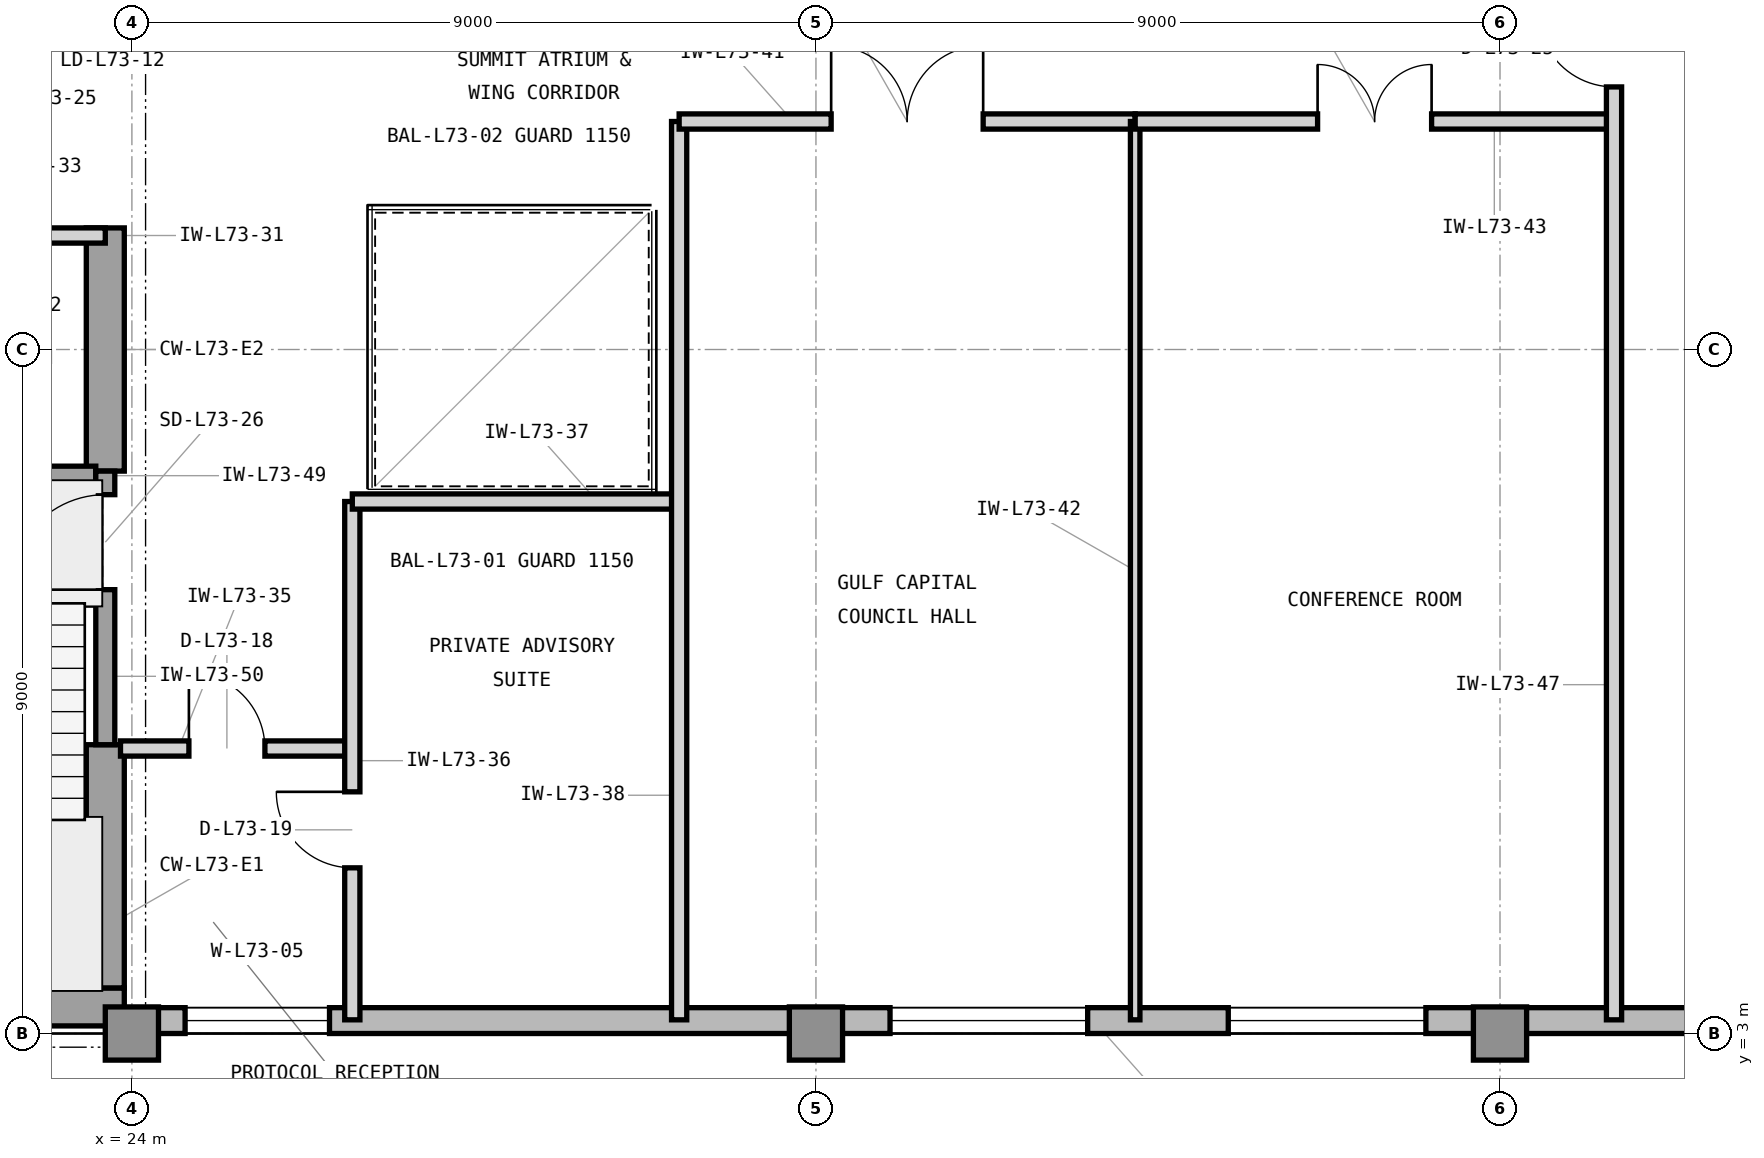
"""IFC4 building model, lengths in metres.
Left out: names, types, materials, properties, quantities, classifications, styles, units other than length and angle.
Written with IfcOpenShell. Run it as: python <this file> out.ifc"""

import sys

from ifc_helpers import new_model, si_unit, direction, frame, frame_2d, origin, origin_2d, place, context, subcontext, project, spatial, rectangle, extrude, element, fill, save


model = new_model("IFC4")
c1 = context("Model", 3, precision=1e-05, world=origin(), true_north=direction((0.0, 1.0)))
c2 = subcontext(c1, "Body", "Model", "MODEL_VIEW")
j1 = project(units=[si_unit("LENGTHUNIT", "METRE"), si_unit("PLANEANGLEUNIT", "RADIAN")], contexts=[c1])
p1 = place(None, origin())
s1 = spatial("IfcSite", under=j1, at=p1, CompositionType="ELEMENT")
p2 = place(p1, origin())
s2 = spatial("IfcBuilding", under=s1, at=p2, CompositionType="ELEMENT")
p3 = place(p2, frame((0.0, 0.0, 297.6)))
s3 = spatial("IfcBuildingStorey", under=s2, at=p3, CompositionType="ELEMENT", Elevation=297.6)
p4 = place(p3, frame((7.475, 3.35, 0.0), z_axis=(0.0, 0.0, 1.0), x_axis=(1.0, 0.0, 0.0)))
e1 = element("IfcWall", 1, at=p4, inside=s3, PredefinedType="SHEAR", context=c2, shape_type="SweptSolid", body=[
    extrude(rectangle(XDim=16.425, YDim=0.5, at=frame_2d((8.212, 0.0))), origin(), (0.0, 0.0, 1.0), 3.9),
])
p5 = place(p3, frame((23.65, 3.6, 0.0), z_axis=(0.0, 0.0, 1.0), x_axis=(0.0, 1.0, 0.0)))
e2 = element("IfcWall", 2, at=p5, inside=s3, PredefinedType="SHEAR", context=c2, shape_type="SweptSolid", body=[
    extrude(rectangle(XDim=3.2, YDim=0.5, at=frame_2d((1.6, 0.0))), origin(), (0.0, 0.0, 1.0), 3.9),
])
p6 = place(p3, frame((23.65, 10.4, 0.0), z_axis=(0.0, 0.0, 1.0), x_axis=(0.0, 1.0, 0.0)))
e3 = element("IfcWall", 3, at=p6, inside=s3, PredefinedType="SHEAR", context=c2, shape_type="SweptSolid", body=[
    extrude(rectangle(XDim=3.2, YDim=0.5, at=frame_2d((1.6, 0.0))), origin(), (0.0, 0.0, 1.0), 3.9),
])
for number, where, z_axis, x_axis in (
    (4, (24.0, 3.0, 0.0), (0.0, 0.0, 1.0), (1.0, 0.0, 0.0)),
    (5, (33.0, 3.0, 0.0), (0.0, 0.0, 1.0), (1.0, 0.0, 0.0)),
    (6, (42.0, 3.0, 0.0), (0.0, 0.0, 1.0), (1.0, 0.0, 0.0)),
):
    element("IfcColumn", number, at=place(p3, frame(where, z_axis=z_axis, x_axis=x_axis)), inside=s3, PredefinedType="COLUMN", context=c2, shape_type="SweptSolid", body=[
        extrude(rectangle(XDim=0.7, YDim=0.7, at=origin_2d()), origin(), (0.0, 0.0, 1.0), 3.9),
    ])
p7 = place(p3, frame((23.9, 3.17, 0.0), z_axis=(0.0, 0.0, 1.0), x_axis=(1.0, 0.0, 0.0)))
e7 = element("IfcWall", 7, at=p7, inside=s3, PredefinedType="STANDARD", context=c2, shape_type="SweptSolid", body=[
    extrude(rectangle(XDim=25.5, YDim=0.34, at=frame_2d((12.75, 0.0))), origin(), (0.0, 0.0, 1.0), 3.715),
])
p8 = place(p7, frame((0.8, 0.0, 0.8)))
e8 = element("IfcOpeningElement", 8, at=p8, cuts=e7, PredefinedType="OPENING", context=c2, shape_type="SweptSolid", body=[
    extrude(rectangle(XDim=1.9, YDim=2.35, at=frame_2d((0.95, 1.175))), frame((0.0, 0.18, 0.0), z_axis=(0.0, -1.0, 0.0), x_axis=(1.0, 0.0, 0.0)), (0.0, 0.0, 1.0), 0.36),
])
p9 = place(p7, frame((10.075, 0.0, 0.8)))
e9 = element("IfcOpeningElement", 9, at=p9, cuts=e7, PredefinedType="OPENING", context=c2, shape_type="SweptSolid", body=[
    extrude(rectangle(XDim=2.6, YDim=2.35, at=frame_2d((1.3, 1.175))), frame((0.0, 0.18, 0.0), z_axis=(0.0, -1.0, 0.0), x_axis=(1.0, 0.0, 0.0)), (0.0, 0.0, 1.0), 0.36),
])
p10 = place(p7, frame((14.525, 0.0, 0.8)))
e10 = element("IfcOpeningElement", 10, at=p10, cuts=e7, PredefinedType="OPENING", context=c2, shape_type="SweptSolid", body=[
    extrude(rectangle(XDim=2.6, YDim=2.35, at=frame_2d((1.3, 1.175))), frame((0.0, 0.18, 0.0), z_axis=(0.0, -1.0, 0.0), x_axis=(1.0, 0.0, 0.0)), (0.0, 0.0, 1.0), 0.36),
])
p11 = place(p3, frame((18.45, 13.5, 0.0), z_axis=(0.0, 0.0, 1.0), x_axis=(1.0, 0.0, 0.0)))
e11 = element("IfcWall", 11, at=p11, inside=s3, PredefinedType="PARTITIONING", context=c2, shape_type="SweptSolid", body=[
    extrude(rectangle(XDim=5.2, YDim=0.2, at=frame_2d((2.6, 0.0))), origin(), (0.0, 0.0, 1.0), 3.354),
])
p12 = place(p11, frame((2.125, 0.0, 0.0)))
e12 = element("IfcOpeningElement", 12, at=p12, cuts=e11, PredefinedType="OPENING", context=c2, shape_type="SweptSolid", body=[
    extrude(rectangle(XDim=0.95, YDim=2.1, at=frame_2d((0.475, 1.05))), frame((0.0, 0.11, 0.0), z_axis=(0.0, -1.0, 0.0), x_axis=(1.0, 0.0, 0.0)), (0.0, 0.0, 1.0), 0.22),
])
p13 = place(p3, frame((23.85, 6.75, 0.0), z_axis=(0.0, 0.0, 1.0), x_axis=(1.0, 0.0, 0.0)))
e13 = element("IfcWall", 13, at=p13, inside=s3, PredefinedType="PARTITIONING", context=c2, shape_type="SweptSolid", body=[
    extrude(rectangle(XDim=3.05, YDim=0.2, at=frame_2d((1.525, 0.0))), origin(), (0.0, 0.0, 1.0), 3.705),
])
p14 = place(p13, frame((0.9, 0.0, 0.0)))
e14 = element("IfcOpeningElement", 14, at=p14, cuts=e13, PredefinedType="OPENING", context=c2, shape_type="SweptSolid", body=[
    extrude(rectangle(XDim=1.0, YDim=2.15, at=frame_2d((0.5, 1.075))), frame((0.0, 0.11, 0.0), z_axis=(0.0, -1.0, 0.0), x_axis=(1.0, 0.0, 0.0)), (0.0, 0.0, 1.0), 0.22),
])
p15 = place(p3, frame((26.9, 3.18, 0.0), z_axis=(0.0, 0.0, 1.0), x_axis=(0.0, 1.0, 0.0)))
e15 = element("IfcWall", 15, at=p15, inside=s3, PredefinedType="PARTITIONING", context=c2, shape_type="SweptSolid", body=[
    extrude(rectangle(XDim=6.82, YDim=0.2, at=frame_2d((3.41, 0.0))), origin(), (0.0, 0.0, 1.0), 3.705),
])
p16 = place(p15, frame((2.0, 0.0, 0.0)))
e16 = element("IfcOpeningElement", 16, at=p16, cuts=e15, PredefinedType="OPENING", context=c2, shape_type="SweptSolid", body=[
    extrude(rectangle(XDim=1.0, YDim=2.15, at=frame_2d((0.5, 1.075))), frame((0.0, 0.11, 0.0), z_axis=(0.0, -1.0, 0.0), x_axis=(1.0, 0.0, 0.0)), (0.0, 0.0, 1.0), 0.22),
])
p17 = place(p3, frame((26.9, 10.0, 0.0), z_axis=(0.0, 0.0, 1.0), x_axis=(1.0, 0.0, 0.0)))
e17 = element("IfcWall", 17, at=p17, inside=s3, PredefinedType="PARTITIONING", context=c2, shape_type="SweptSolid", body=[
    extrude(rectangle(XDim=4.3, YDim=0.2, at=frame_2d((2.15, 0.0))), origin(), (0.0, 0.0, 1.0), 3.705),
])
p18 = place(p3, frame((31.2, 3.18, 0.0), z_axis=(0.0, 0.0, 1.0), x_axis=(0.0, 1.0, 0.0)))
e18 = element("IfcWall", 18, at=p18, inside=s3, PredefinedType="PARTITIONING", context=c2, shape_type="SweptSolid", body=[
    extrude(rectangle(XDim=11.82, YDim=0.2, at=frame_2d((5.91, 0.0))), origin(), (0.0, 0.0, 1.0), 3.705),
])
p19 = place(p3, frame((31.2, 15.0, 0.0), z_axis=(0.0, 0.0, 1.0), x_axis=(1.0, 0.0, 0.0)))
e19 = element("IfcWall", 19, at=p19, inside=s3, PredefinedType="PARTITIONING", context=c2, shape_type="SweptSolid", body=[
    extrude(rectangle(XDim=6.0, YDim=0.2, at=frame_2d((3.0, 0.0))), origin(), (0.0, 0.0, 1.0), 3.354),
])
p20 = place(p19, frame((2.0, 0.0, 0.0)))
e20 = element("IfcOpeningElement", 20, at=p20, cuts=e19, PredefinedType="OPENING", context=c2, shape_type="SweptSolid", body=[
    extrude(rectangle(XDim=2.0, YDim=2.5, at=frame_2d((1.0, 1.25))), frame((0.0, 0.11, 0.0), z_axis=(0.0, -1.0, 0.0), x_axis=(1.0, 0.0, 0.0)), (0.0, 0.0, 1.0), 0.22),
])
p21 = place(p3, frame((37.2, 3.18, 0.0), z_axis=(0.0, 0.0, 1.0), x_axis=(0.0, 1.0, 0.0)))
e21 = element("IfcWall", 21, at=p21, inside=s3, PredefinedType="PARTITIONING", context=c2, shape_type="SweptSolid", body=[
    extrude(rectangle(XDim=11.82, YDim=0.125, at=frame_2d((5.91, 0.0))), origin(), (0.0, 0.0, 1.0), 3.705),
])
p22 = place(p3, frame((37.2, 15.0, 0.0), z_axis=(0.0, 0.0, 1.0), x_axis=(1.0, 0.0, 0.0)))
e22 = element("IfcWall", 22, at=p22, inside=s3, PredefinedType="PARTITIONING", context=c2, shape_type="SweptSolid", body=[
    extrude(rectangle(XDim=6.3, YDim=0.2, at=frame_2d((3.15, 0.0))), origin(), (0.0, 0.0, 1.0), 3.354),
])
p23 = place(p22, frame((2.4, 0.0, 0.0)))
e23 = element("IfcOpeningElement", 23, at=p23, cuts=e22, PredefinedType="OPENING", context=c2, shape_type="SweptSolid", body=[
    extrude(rectangle(XDim=1.5, YDim=2.3, at=frame_2d((0.75, 1.15))), frame((0.0, 0.11, 0.0), z_axis=(0.0, -1.0, 0.0), x_axis=(1.0, 0.0, 0.0)), (0.0, 0.0, 1.0), 0.22),
])
p24 = place(p3, frame((43.5, 3.18, 0.0), z_axis=(0.0, 0.0, 1.0), x_axis=(0.0, 1.0, 0.0)))
e24 = element("IfcWall", 24, at=p24, inside=s3, PredefinedType="PARTITIONING", context=c2, shape_type="SweptSolid", body=[
    extrude(rectangle(XDim=17.64, YDim=0.2, at=frame_2d((8.82, 0.0))), origin(), (0.0, 0.0, 1.0), 3.705),
])
p25 = place(p24, frame((12.275, 0.0, 0.0)))
e25 = element("IfcOpeningElement", 25, at=p25, cuts=e24, PredefinedType="OPENING", context=c2, shape_type="SweptSolid", body=[
    extrude(rectangle(XDim=1.0, YDim=2.15, at=frame_2d((0.5, 1.075))), frame((0.0, 0.11, 0.0), z_axis=(0.0, -1.0, 0.0), x_axis=(1.0, 0.0, 0.0)), (0.0, 0.0, 1.0), 0.22),
])
p26 = place(p3, frame((19.705, 10.34, 0.0), z_axis=(0.0, 0.0, 1.0), x_axis=(1.0, 0.0, 0.0)))
e26 = element("IfcWall", 26, at=p26, inside=s3, PredefinedType="SHEAR", context=c2, shape_type="SweptSolid", body=[
    extrude(rectangle(XDim=3.82, YDim=0.25, at=frame_2d((1.91, 0.0))), origin(), (0.0, 0.0, 1.0), 3.9),
])
p27 = place(p3, frame((23.65, 6.8, 0.0), z_axis=(0.0, 0.0, 1.0), x_axis=(0.0, 1.0, 0.0)))
e27 = element("IfcWall", 27, at=p27, inside=s3, PredefinedType="SHEAR", context=c2, shape_type="SweptSolid", body=[
    extrude(rectangle(XDim=3.6, YDim=0.25, at=frame_2d((1.8, 0.0))), origin(), (0.0, 0.0, 1.0), 3.9),
])
p28 = place(p27, frame((2.04, 0.0, 0.0)))
e28 = element("IfcOpeningElement", 28, at=p28, cuts=e27, PredefinedType="OPENING", context=c2, shape_type="SweptSolid", body=[
    extrude(rectangle(XDim=1.25, YDim=2.2, at=frame_2d((0.625, 1.1))), frame((0.0, 0.135, 0.0), z_axis=(0.0, -1.0, 0.0), x_axis=(1.0, 0.0, 0.0)), (0.0, 0.0, 1.0), 0.27),
])
p29 = place(p14, origin())
e29 = element("IfcDoor", 29, at=p29, inside=s3, OperationType="SINGLE_SWING_LEFT", PredefinedType="DOOR", context=c2, shape_type="SweptSolid", body=[
    extrude(rectangle(XDim=1.0, YDim=2.15, at=frame_2d((0.5, 1.075))), frame((0.0, 0.025, 0.0), z_axis=(0.0, -1.0, 0.0), x_axis=(1.0, 0.0, 0.0)), (0.0, 0.0, 1.0), 0.05),
])
fill(e14, e29)
p30 = place(p16, origin())
e30 = element("IfcDoor", 30, at=p30, inside=s3, OperationType="SINGLE_SWING_RIGHT", PredefinedType="DOOR", context=c2, shape_type="SweptSolid", body=[
    extrude(rectangle(XDim=1.0, YDim=2.15, at=frame_2d((0.5, 1.075))), frame((0.0, 0.025, 0.0), z_axis=(0.0, -1.0, 0.0), x_axis=(1.0, 0.0, 0.0)), (0.0, 0.0, 1.0), 0.05),
])
fill(e16, e30)
p31 = place(p20, origin())
e31 = element("IfcDoor", 31, at=p31, inside=s3, OperationType="DOUBLE_DOOR_SINGLE_SWING", PredefinedType="DOOR", context=c2, shape_type="SweptSolid", body=[
    extrude(rectangle(XDim=2.0, YDim=2.5, at=frame_2d((1.0, 1.25))), frame((0.0, 0.025, 0.0), z_axis=(0.0, -1.0, 0.0), x_axis=(1.0, 0.0, 0.0)), (0.0, 0.0, 1.0), 0.05),
])
fill(e20, e31)
p32 = place(p23, origin())
e32 = element("IfcDoor", 32, at=p32, inside=s3, OperationType="DOUBLE_DOOR_SINGLE_SWING", PredefinedType="DOOR", context=c2, shape_type="SweptSolid", body=[
    extrude(rectangle(XDim=1.5, YDim=2.3, at=frame_2d((0.75, 1.15))), frame((0.0, 0.025, 0.0), z_axis=(0.0, -1.0, 0.0), x_axis=(1.0, 0.0, 0.0)), (0.0, 0.0, 1.0), 0.05),
])
fill(e23, e32)
p33 = place(p25, origin())
e33 = element("IfcDoor", 33, at=p33, inside=s3, OperationType="SINGLE_SWING_RIGHT", PredefinedType="DOOR", context=c2, shape_type="SweptSolid", body=[
    extrude(rectangle(XDim=1.0, YDim=2.15, at=frame_2d((0.5, 1.075))), frame((0.0, 0.025, 0.0), z_axis=(0.0, -1.0, 0.0), x_axis=(1.0, 0.0, 0.0)), (0.0, 0.0, 1.0), 0.05),
])
fill(e25, e33)
p34 = place(p28, origin())
e34 = element("IfcDoor", 34, at=p34, inside=s3, OperationType="SINGLE_SWING_LEFT", PredefinedType="DOOR", context=c2, shape_type="SweptSolid", body=[
    extrude(rectangle(XDim=1.25, YDim=2.2, at=frame_2d((0.625, 1.1))), frame((0.0, 0.025, 0.0), z_axis=(0.0, -1.0, 0.0), x_axis=(1.0, 0.0, 0.0)), (0.0, 0.0, 1.0), 0.05),
])
fill(e28, e34)
p35 = place(p8, origin())
e35 = element("IfcWindow", 35, at=p35, inside=s3, PartitioningType="SINGLE_PANEL", PredefinedType="WINDOW", context=c2, shape_type="SweptSolid", body=[
    extrude(rectangle(XDim=1.9, YDim=2.35, at=frame_2d((0.95, 1.175))), frame((0.0, 0.11, 0.0), z_axis=(0.0, -1.0, 0.0), x_axis=(1.0, 0.0, 0.0)), (0.0, 0.0, 1.0), 0.06),
])
fill(e8, e35)
p36 = place(p9, origin())
e36 = element("IfcWindow", 36, at=p36, inside=s3, PartitioningType="SINGLE_PANEL", PredefinedType="WINDOW", context=c2, shape_type="SweptSolid", body=[
    extrude(rectangle(XDim=2.6, YDim=2.35, at=frame_2d((1.3, 1.175))), frame((0.0, 0.11, 0.0), z_axis=(0.0, -1.0, 0.0), x_axis=(1.0, 0.0, 0.0)), (0.0, 0.0, 1.0), 0.06),
])
fill(e9, e36)
p37 = place(p10, origin())
e37 = element("IfcWindow", 37, at=p37, inside=s3, PartitioningType="SINGLE_PANEL", PredefinedType="WINDOW", context=c2, shape_type="SweptSolid", body=[
    extrude(rectangle(XDim=2.6, YDim=2.35, at=frame_2d((1.3, 1.175))), frame((0.0, 0.11, 0.0), z_axis=(0.0, -1.0, 0.0), x_axis=(1.0, 0.0, 0.0)), (0.0, 0.0, 1.0), 0.06),
])
fill(e10, e37)
save(model, sys.argv[1])
